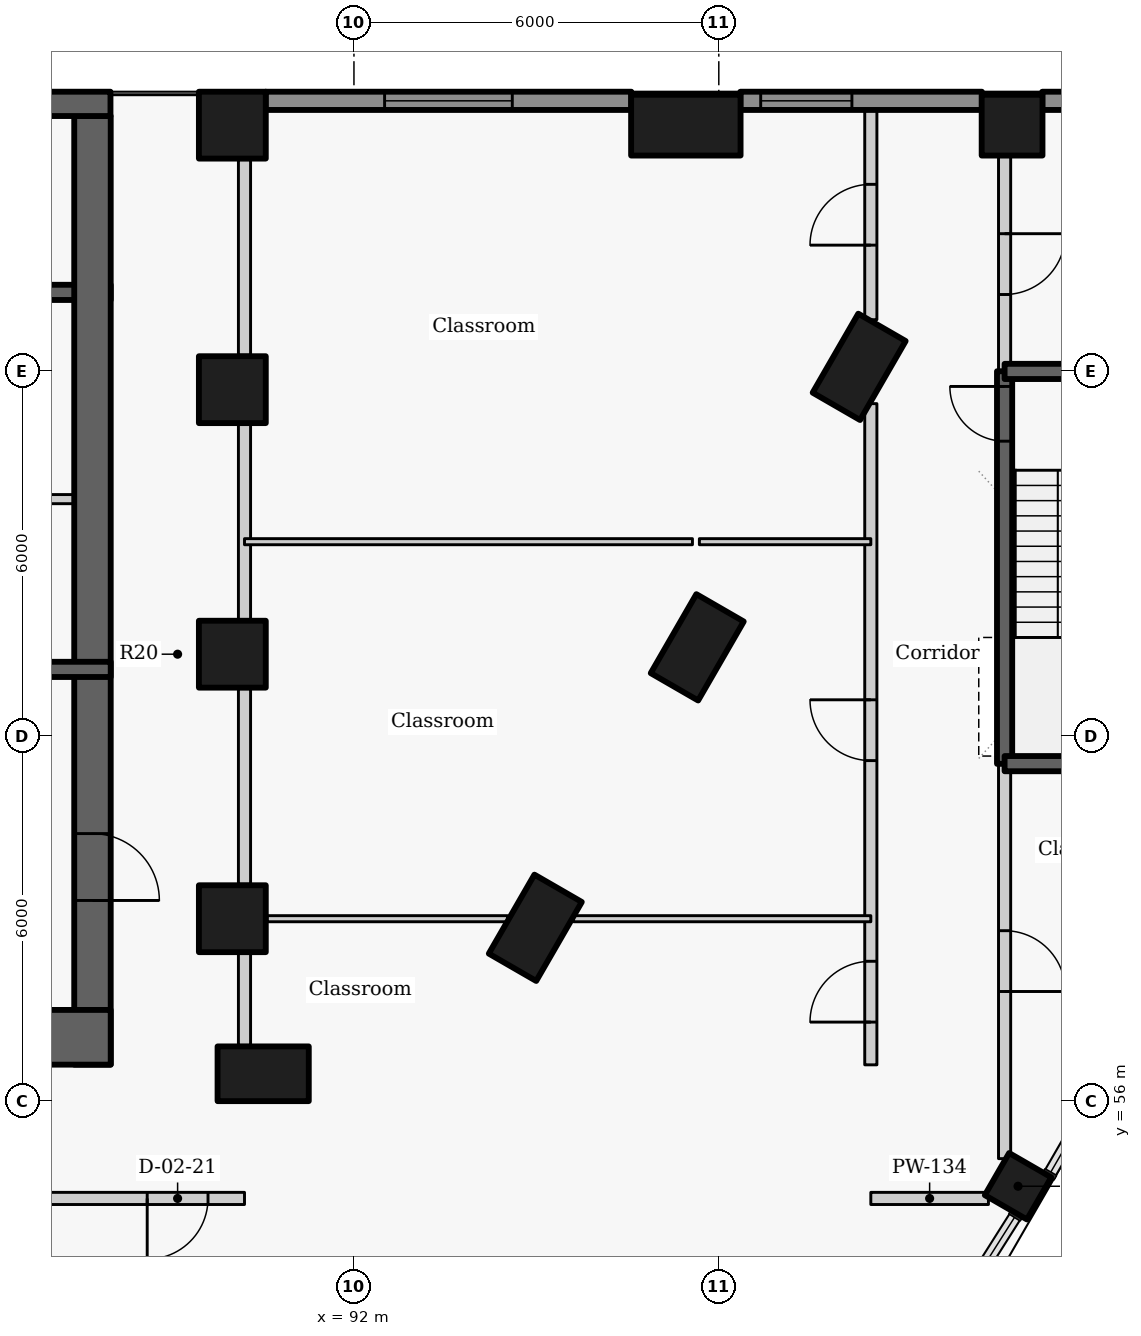
"""IFC4 building model, lengths in metres.
Left out: names, types, materials, properties, quantities, classifications, styles, units other than length and angle.
Written with IfcOpenShell. Run it as: python <this file> out.ifc"""

import sys

from ifc_helpers import new_model, si_unit, direction, frame, frame_2d, origin, origin_2d, place, context, subcontext, project, spatial, rectangle, extrude, element, fill, save


model = new_model("IFC4")
c1 = context("Model", 3, precision=1e-05, world=origin(), true_north=direction((0.0, 1.0)))
c2 = subcontext(c1, "Body", "Model", "MODEL_VIEW")
j1 = project(units=[si_unit("LENGTHUNIT", "METRE"), si_unit("PLANEANGLEUNIT", "RADIAN")], contexts=[c1])
p1 = place(None, origin())
s1 = spatial("IfcSite", under=j1, at=p1, CompositionType="ELEMENT")
p2 = place(p1, origin())
s2 = spatial("IfcBuilding", under=s1, at=p2, CompositionType="ELEMENT")
p3 = place(p2, frame((0.0, 0.0, 15.6)))
s3 = spatial("IfcBuildingStorey", under=s2, at=p3, CompositionType="ELEMENT", Elevation=15.6)
for number, where, z_axis, x_axis in (
    (1, (90.507, 56.45, 0.0), (0.0, 0.0, 1.0), (1.0, 0.0, 0.0)),
    (2, (94.982, 58.851, 0.0), (0.0, 0.0, 1.0), (0.5, 0.866, 0.0)),
    (3, (97.646, 63.463, 0.0), (0.0, 0.0, 1.0), (0.5, 0.866, 0.0)),
    (4, (100.308, 68.075, 0.0), (0.0, 0.0, 1.0), (0.5, 0.866, 0.0)),
):
    element("IfcColumn", number, at=place(p3, frame(where, z_axis=z_axis, x_axis=x_axis)), inside=s3, PredefinedType="COLUMN", context=c2, shape_type="SweptSolid", body=[
        extrude(rectangle(XDim=1.5, YDim=0.9, at=origin_2d()), origin(), (0.0, 0.0, 1.0), 4.2),
    ])
for number, where, z_axis, x_axis in (
    (5, (90.0, 59.0, 0.0), (0.0, 0.0, 1.0), (0.0, 1.0, 0.0)),
    (6, (90.0, 63.35, 0.0), (0.0, 0.0, 1.0), (0.0, 1.0, 0.0)),
    (7, (90.0, 67.7, 0.0), (0.0, 0.0, 1.0), (0.0, 1.0, 0.0)),
    (8, (90.0, 72.05, 0.0), (0.0, 0.0, 1.0), (0.0, 1.0, 0.0)),
):
    element("IfcColumn", number, at=place(p3, frame(where, z_axis=z_axis, x_axis=x_axis)), inside=s3, PredefinedType="COLUMN", context=c2, shape_type="SweptSolid", body=[
        extrude(rectangle(XDim=1.1, YDim=1.1, at=origin_2d()), origin(), (0.0, 0.0, 1.0), 4.2),
    ])
p4 = place(p3, frame((102.921, 54.6, 0.0), z_axis=(0.0, 0.0, 1.0), x_axis=(0.5, 0.866025403784, 0.0)))
e9 = element("IfcColumn", 9, at=p4, inside=s3, PredefinedType="COLUMN", context=c2, shape_type="SweptSolid", body=[
    extrude(rectangle(XDim=0.8, YDim=0.8, at=origin_2d()), origin(), (0.0, 0.0, 1.0), 4.2),
])
p5 = place(p3, frame((97.458, 72.05, 0.0), z_axis=(0.0, 0.0, 1.0), x_axis=(1.0, 0.0, 0.0)))
e10 = element("IfcColumn", 10, at=p5, inside=s3, PredefinedType="COLUMN", context=c2, shape_type="SweptSolid", body=[
    extrude(rectangle(XDim=1.8, YDim=1.0, at=origin_2d()), origin(), (0.0, 0.0, 1.0), 4.2),
])
p6 = place(p3, frame((102.823, 72.05, 0.0), z_axis=(0.0, 0.0, 1.0), x_axis=(1.0, 0.0, 0.0)))
e11 = element("IfcColumn", 11, at=p6, inside=s3, PredefinedType="COLUMN", context=c2, shape_type="SweptSolid", body=[
    extrude(rectangle(XDim=1.0, YDim=1.0, at=origin_2d()), origin(), (0.0, 0.0, 1.0), 4.2),
])
p7 = place(p3, frame((107.413, 72.45, 0.0), z_axis=(0.0, 0.0, 1.0), x_axis=(-1.0, 0.0, 0.0)))
e12 = element("IfcWall", 12, at=p7, inside=s3, PredefinedType="SOLIDWALL", context=c2, shape_type="SweptSolid", body=[
    extrude(rectangle(XDim=4.094, YDim=0.3, at=frame_2d((2.047, 0.0))), origin(), (0.0, 0.0, 1.0), 3.0),
])
p8 = place(p7, frame((0.997, 0.0, 0.9)))
e13 = element("IfcOpeningElement", 13, at=p8, cuts=e12, PredefinedType="OPENING", context=c2, shape_type="SweptSolid", body=[
    extrude(rectangle(XDim=2.1, YDim=2.05, at=frame_2d((1.05, 1.025))), frame((0.0, 0.16, 0.0), z_axis=(0.0, -1.0, 0.0), x_axis=(1.0, 0.0, 0.0)), (0.0, 0.0, 1.0), 0.32),
])
p9 = place(p3, frame((102.327, 72.45, 0.0), z_axis=(0.0, 0.0, 1.0), x_axis=(-1.0, 0.0, 0.0)))
e14 = element("IfcWall", 14, at=p9, inside=s3, PredefinedType="SOLIDWALL", context=c2, shape_type="SweptSolid", body=[
    extrude(rectangle(XDim=3.973, YDim=0.3, at=frame_2d((1.986, 0.0))), origin(), (0.0, 0.0, 1.0), 3.0),
])
p10 = place(p9, frame((2.138, 0.0, 0.9)))
e15 = element("IfcOpeningElement", 15, at=p10, cuts=e14, PredefinedType="OPENING", context=c2, shape_type="SweptSolid", body=[
    extrude(rectangle(XDim=1.5, YDim=2.05, at=frame_2d((0.75, 1.025))), frame((0.0, 0.16, 0.0), z_axis=(0.0, -1.0, 0.0), x_axis=(1.0, 0.0, 0.0)), (0.0, 0.0, 1.0), 0.32),
])
p11 = place(p3, frame((96.562, 72.45, 0.0), z_axis=(0.0, 0.0, 1.0), x_axis=(-1.0, 0.0, 0.0)))
e16 = element("IfcWall", 16, at=p11, inside=s3, PredefinedType="SOLIDWALL", context=c2, shape_type="SweptSolid", body=[
    extrude(rectangle(XDim=6.016, YDim=0.3, at=frame_2d((3.008, 0.0))), origin(), (0.0, 0.0, 1.0), 3.0),
])
p12 = place(p11, frame((1.958, 0.0, 0.9)))
e17 = element("IfcOpeningElement", 17, at=p12, cuts=e16, PredefinedType="OPENING", context=c2, shape_type="SweptSolid", body=[
    extrude(rectangle(XDim=2.1, YDim=2.05, at=frame_2d((1.05, 1.025))), frame((0.0, 0.16, 0.0), z_axis=(0.0, -1.0, 0.0), x_axis=(1.0, 0.0, 0.0)), (0.0, 0.0, 1.0), 0.32),
])
p13 = place(p3, frame((85.4, 69.3, -0.3), z_axis=(0.0, 0.0, 1.0), x_axis=(1.0, 0.0, 0.0)))
e18 = element("IfcWall", 18, at=p13, inside=s3, PredefinedType="SHEAR", context=c2, shape_type="SweptSolid", body=[
    extrude(rectangle(XDim=2.6, YDim=0.25, at=frame_2d((1.3, 0.0))), origin(), (0.0, 0.0, 1.0), 4.2),
])
p14 = place(p13, frame((0.525, 0.0, 0.3)))
e19 = element("IfcOpeningElement", 19, at=p14, cuts=e18, PredefinedType="OPENING", context=c2, shape_type="SweptSolid", body=[
    extrude(rectangle(XDim=0.9, YDim=2.1, at=frame_2d((0.45, 1.05))), frame((0.0, 0.135, 0.0), z_axis=(0.0, -1.0, 0.0), x_axis=(1.0, 0.0, 0.0)), (0.0, 0.0, 1.0), 0.27),
])
p15 = place(p3, frame((87.7, 72.2, -0.3), z_axis=(0.0, 0.0, 1.0), x_axis=(0.0, -1.0, 0.0)))
e20 = element("IfcWall", 20, at=p15, inside=s3, PredefinedType="SHEAR", context=c2, shape_type="SweptSolid", body=[
    extrude(rectangle(XDim=15.6, YDim=0.6, at=frame_2d((7.8, 0.0))), origin(), (0.0, 0.0, 1.0), 4.2),
])
p16 = place(p15, frame((11.8, 0.0, 0.3)))
e21 = element("IfcOpeningElement", 21, at=p16, cuts=e20, PredefinedType="OPENING", context=c2, shape_type="SweptSolid", body=[
    extrude(rectangle(XDim=1.1, YDim=2.1, at=frame_2d((0.55, 1.05))), frame((0.0, 0.31, 0.0), z_axis=(0.0, -1.0, 0.0), x_axis=(1.0, 0.0, 0.0)), (0.0, 0.0, 1.0), 0.62),
])
p17 = place(p3, frame((88.0, 65.9, 0.0), z_axis=(0.0, 0.0, 1.0), x_axis=(-1.0, 0.0, 0.0)))
e22 = element("IfcWall", 22, at=p17, inside=s3, PredefinedType="PARTITIONING", context=c2, shape_type="SweptSolid", body=[
    extrude(rectangle(XDim=2.603, YDim=0.15, at=frame_2d((1.302, 0.0))), origin(), (0.0, 0.0, 1.0), 3.9),
])
p18 = place(p17, frame((1.175, 0.0, 0.0)))
e23 = element("IfcOpeningElement", 23, at=p18, cuts=e22, PredefinedType="OPENING", context=c2, shape_type="SweptSolid", body=[
    extrude(rectangle(XDim=0.9, YDim=2.1, at=frame_2d((0.45, 1.05))), frame((0.0, 0.085, 0.0), z_axis=(0.0, -1.0, 0.0), x_axis=(1.0, 0.0, 0.0)), (0.0, 0.0, 1.0), 0.17),
])
p19 = place(p3, frame((80.0, 63.1, -0.3), z_axis=(0.0, 0.0, 1.0), x_axis=(1.0, 0.0, 0.0)))
e24 = element("IfcWall", 24, at=p19, inside=s3, PredefinedType="SHEAR", context=c2, shape_type="SweptSolid", body=[
    extrude(rectangle(XDim=8.0, YDim=0.25, at=frame_2d((4.0, 0.0))), origin(), (0.0, 0.0, 1.0), 4.2),
])
p20 = place(p19, frame((3.849, 0.0, 0.3)))
e25 = element("IfcOpeningElement", 25, at=p20, cuts=e24, PredefinedType="OPENING", context=c2, shape_type="SweptSolid", body=[
    extrude(rectangle(XDim=1.1, YDim=2.1, at=frame_2d((0.55, 1.05))), frame((0.0, 0.135, 0.0), z_axis=(0.0, -1.0, 0.0), x_axis=(1.0, 0.0, 0.0)), (0.0, 0.0, 1.0), 0.27),
])
p21 = place(p3, frame((88.0, 57.05, -0.3), z_axis=(0.0, 0.0, 1.0), x_axis=(-1.0, 0.0, 0.0)))
e26 = element("IfcWall", 26, at=p21, inside=s3, PredefinedType="SHEAR", context=c2, shape_type="SweptSolid", body=[
    extrude(rectangle(XDim=4.6, YDim=0.9, at=frame_2d((2.3, 0.0))), origin(), (0.0, 0.0, 1.0), 4.2),
])
p22 = place(p21, frame((1.752, 0.0, 0.3)))
e27 = element("IfcOpeningElement", 27, at=p22, cuts=e26, PredefinedType="OPENING", context=c2, shape_type="SweptSolid", body=[
    extrude(rectangle(XDim=1.1, YDim=2.1, at=frame_2d((0.55, 1.05))), frame((0.0, 0.46, 0.0), z_axis=(0.0, -1.0, 0.0), x_axis=(1.0, 0.0, 0.0)), (0.0, 0.0, 1.0), 0.92),
])
p23 = place(p3, frame((102.7, 61.547, -0.3), z_axis=(0.0, 0.0, 1.0), x_axis=(0.0, 1.0, 0.0)))
e28 = element("IfcWall", 28, at=p23, inside=s3, PredefinedType="SHEAR", context=c2, shape_type="SweptSolid", body=[
    extrude(rectangle(XDim=6.456, YDim=0.25, at=frame_2d((3.228, 0.0))), origin(), (0.0, 0.0, 1.0), 4.2),
])
p24 = place(p23, frame((5.306, 0.0, 0.3)))
e29 = element("IfcOpeningElement", 29, at=p24, cuts=e28, PredefinedType="OPENING", context=c2, shape_type="SweptSolid", body=[
    extrude(rectangle(XDim=0.9, YDim=2.1, at=frame_2d((0.45, 1.05))), frame((0.0, 0.135, 0.0), z_axis=(0.0, -1.0, 0.0), x_axis=(1.0, 0.0, 0.0)), (0.0, 0.0, 1.0), 0.27),
])
p25 = place(p3, frame((102.7, 61.553, 0.0), z_axis=(0.0, 0.0, 1.0), x_axis=(0.0, -1.0, 0.0)))
e30 = element("IfcWall", 30, at=p25, inside=s3, PredefinedType="PARTITIONING", context=c2, shape_type="SweptSolid", body=[
    extrude(rectangle(XDim=6.499, YDim=0.2, at=frame_2d((3.249, 0.0))), origin(), (0.0, 0.0, 1.0), 3.9),
])
p26 = place(p25, frame((2.75, 0.0, 0.0)))
e31 = element("IfcOpeningElement", 31, at=p26, cuts=e30, PredefinedType="OPENING", context=c2, shape_type="SweptSolid", body=[
    extrude(rectangle(XDim=1.0, YDim=2.1, at=frame_2d((0.5, 1.05))), frame((0.0, 0.11, 0.0), z_axis=(0.0, -1.0, 0.0), x_axis=(1.0, 0.0, 0.0)), (0.0, 0.0, 1.0), 0.22),
])
p27 = place(p3, frame((102.7, 71.533, 0.0), z_axis=(0.0, 0.0, 1.0), x_axis=(0.0, -1.0, 0.0)))
e32 = element("IfcWall", 32, at=p27, inside=s3, PredefinedType="PARTITIONING", context=c2, shape_type="SweptSolid", body=[
    extrude(rectangle(XDim=3.536, YDim=0.2, at=frame_2d((1.768, 0.0))), origin(), (0.0, 0.0, 1.0), 3.9),
])
p28 = place(p27, frame((1.268, 0.0, 0.0)))
e33 = element("IfcOpeningElement", 33, at=p28, cuts=e32, PredefinedType="OPENING", context=c2, shape_type="SweptSolid", body=[
    extrude(rectangle(XDim=1.0, YDim=2.1, at=frame_2d((0.5, 1.05))), frame((0.0, 0.11, 0.0), z_axis=(0.0, -1.0, 0.0), x_axis=(1.0, 0.0, 0.0)), (0.0, 0.0, 1.0), 0.22),
])
p29 = place(p3, frame((100.5, 56.597, 0.0), z_axis=(0.0, 0.0, 1.0), x_axis=(0.0, 1.0, 0.0)))
e34 = element("IfcWall", 34, at=p29, inside=s3, PredefinedType="PARTITIONING", context=c2, shape_type="SweptSolid", body=[
    extrude(rectangle(XDim=10.873, YDim=0.2, at=frame_2d((5.437, 0.0))), origin(), (0.0, 0.0, 1.0), 3.9),
])
p30 = place(p29, frame((5.003, 0.0, 0.0)))
e35 = element("IfcOpeningElement", 35, at=p30, cuts=e34, PredefinedType="OPENING", context=c2, shape_type="SweptSolid", body=[
    extrude(rectangle(XDim=1.0, YDim=2.1, at=frame_2d((0.5, 1.05))), frame((0.0, 0.11, 0.0), z_axis=(0.0, -1.0, 0.0), x_axis=(1.0, 0.0, 0.0)), (0.0, 0.0, 1.0), 0.22),
])
p31 = place(p29, frame((0.703, 0.0, 0.0)))
e36 = element("IfcOpeningElement", 36, at=p31, cuts=e34, PredefinedType="OPENING", context=c2, shape_type="SweptSolid", body=[
    extrude(rectangle(XDim=1.0, YDim=2.1, at=frame_2d((0.5, 1.05))), frame((0.0, 0.11, 0.0), z_axis=(0.0, -1.0, 0.0), x_axis=(1.0, 0.0, 0.0)), (0.0, 0.0, 1.0), 0.22),
])
p32 = place(p3, frame((100.5, 68.851, 0.0), z_axis=(0.0, 0.0, 1.0), x_axis=(0.0, 1.0, 0.0)))
e37 = element("IfcWall", 37, at=p32, inside=s3, PredefinedType="PARTITIONING", context=c2, shape_type="SweptSolid", body=[
    extrude(rectangle(XDim=3.449, YDim=0.2, at=frame_2d((1.725, 0.0))), origin(), (0.0, 0.0, 1.0), 3.13),
])
p33 = place(p32, frame((1.226, 0.0, 0.0)))
e38 = element("IfcOpeningElement", 38, at=p33, cuts=e37, PredefinedType="OPENING", context=c2, shape_type="SweptSolid", body=[
    extrude(rectangle(XDim=1.0, YDim=2.1, at=frame_2d((0.5, 1.05))), frame((0.0, 0.11, 0.0), z_axis=(0.0, -1.0, 0.0), x_axis=(1.0, 0.0, 0.0)), (0.0, 0.0, 1.0), 0.22),
])
p34 = place(p3, frame((90.2, 56.917, 0.0), z_axis=(0.0, 0.0, 1.0), x_axis=(0.0, 1.0, 0.0)))
e39 = element("IfcWall", 39, at=p34, inside=s3, PredefinedType="PARTITIONING", context=c2, shape_type="SweptSolid", body=[
    extrude(rectangle(XDim=1.516, YDim=0.2, at=frame_2d((0.758, 0.0))), origin(), (0.0, 0.0, 1.0), 3.9),
])
for number, where, z_axis, x_axis in (
    (40, (90.2, 59.567, 0.0), (0.0, 0.0, 1.0), (0.0, 1.0, 0.0)),
    (41, (90.2, 63.917, 0.0), (0.0, 0.0, 1.0), (0.0, 1.0, 0.0)),
):
    element("IfcWall", number, at=place(p3, frame(where, z_axis=z_axis, x_axis=x_axis)), inside=s3, PredefinedType="PARTITIONING", context=c2, shape_type="SweptSolid", body=[
        extrude(rectangle(XDim=3.216, YDim=0.2, at=frame_2d((1.608, 0.0))), origin(), (0.0, 0.0, 1.0), 3.13),
    ])
p35 = place(p3, frame((90.2, 68.267, 0.0), z_axis=(0.0, 0.0, 1.0), x_axis=(0.0, 1.0, 0.0)))
e42 = element("IfcWall", 42, at=p35, inside=s3, PredefinedType="PARTITIONING", context=c2, shape_type="SweptSolid", body=[
    extrude(rectangle(XDim=3.216, YDim=0.2, at=frame_2d((1.608, 0.0))), origin(), (0.0, 0.0, 1.0), 3.13),
])
p36 = place(p3, frame((90.2, 54.4, 0.0), z_axis=(0.0, 0.0, 1.0), x_axis=(-1.0, 0.0, 0.0)))
e43 = element("IfcWall", 43, at=p36, inside=s3, PredefinedType="PARTITIONING", context=c2, shape_type="SweptSolid", body=[
    extrude(rectangle(XDim=20.4, YDim=0.2, at=frame_2d((10.2, 0.0))), origin(), (0.0, 0.0, 1.0), 3.9),
])
p37 = place(p36, frame((18.8, 0.0, 0.0)))
e44 = element("IfcOpeningElement", 44, at=p37, cuts=e43, PredefinedType="OPENING", context=c2, shape_type="SweptSolid", body=[
    extrude(rectangle(XDim=1.0, YDim=2.1, at=frame_2d((0.5, 1.05))), frame((0.0, 0.11, 0.0), z_axis=(0.0, -1.0, 0.0), x_axis=(1.0, 0.0, 0.0)), (0.0, 0.0, 1.0), 0.22),
])
p38 = place(p36, frame((0.6, 0.0, 0.0)))
e45 = element("IfcOpeningElement", 45, at=p38, cuts=e43, PredefinedType="OPENING", context=c2, shape_type="SweptSolid", body=[
    extrude(rectangle(XDim=1.0, YDim=2.1, at=frame_2d((0.5, 1.05))), frame((0.0, 0.11, 0.0), z_axis=(0.0, -1.0, 0.0), x_axis=(1.0, 0.0, 0.0)), (0.0, 0.0, 1.0), 0.22),
])
p39 = place(p36, frame((10.1, 0.0, 0.0)))
e46 = element("IfcOpeningElement", 46, at=p39, cuts=e43, PredefinedType="OPENING", context=c2, shape_type="SweptSolid", body=[
    extrude(rectangle(XDim=1.0, YDim=2.1, at=frame_2d((0.5, 1.05))), frame((0.0, 0.11, 0.0), z_axis=(0.0, -1.0, 0.0), x_axis=(1.0, 0.0, 0.0)), (0.0, 0.0, 1.0), 0.22),
])
p40 = place(p3, frame((100.5, 54.4, 0.0), z_axis=(0.0, 0.0, 1.0), x_axis=(1.0, 0.0, 0.0)))
e47 = element("IfcWall", 47, at=p40, inside=s3, PredefinedType="PARTITIONING", context=c2, shape_type="SweptSolid", body=[
    extrude(rectangle(XDim=1.934, YDim=0.2, at=frame_2d((0.967, 0.0))), origin(), (0.0, 0.0, 1.0), 3.9),
])
for number, where, z_axis, x_axis in (
    (48, (102.7, 68.0, -0.3), (0.0, 0.0, 1.0), (1.0, 0.0, 0.0)),
    (49, (102.7, 61.55, -0.3), (0.0, 0.0, 1.0), (1.0, 0.0, 0.0)),
):
    element("IfcWall", number, at=place(p3, frame(where, z_axis=z_axis, x_axis=x_axis)), inside=s3, PredefinedType="SHEAR", context=c2, shape_type="SweptSolid", body=[
        extrude(rectangle(XDim=3.45, YDim=0.25, at=frame_2d((1.725, 0.0))), origin(), (0.0, 0.0, 1.0), 4.2),
    ])
p41 = place(p3, frame((90.2, 65.2, 0.0), z_axis=(0.0, 0.0, 1.0), x_axis=(1.0, 0.0, 0.0)))
e50 = element("IfcWall", 50, at=p41, inside=s3, PredefinedType="PARTITIONING", context=c2, shape_type="SweptSolid", body=[
    extrude(rectangle(XDim=7.366, YDim=0.1, at=frame_2d((3.683, 0.0))), origin(), (0.0, 0.0, 1.0), 3.9),
])
p42 = place(p3, frame((97.68, 65.2, 0.0), z_axis=(0.0, 0.0, 1.0), x_axis=(1.0, 0.0, 0.0)))
e51 = element("IfcWall", 51, at=p42, inside=s3, PredefinedType="PARTITIONING", context=c2, shape_type="SweptSolid", body=[
    extrude(rectangle(XDim=2.82, YDim=0.1, at=frame_2d((1.41, 0.0))), origin(), (0.0, 0.0, 1.0), 2.98),
])
p43 = place(p3, frame((90.57, 59.0, 0.0), z_axis=(0.0, 0.0, 1.0), x_axis=(1.0, 0.0, 0.0)))
e52 = element("IfcWall", 52, at=p43, inside=s3, PredefinedType="PARTITIONING", context=c2, shape_type="SweptSolid", body=[
    extrude(rectangle(XDim=3.956, YDim=0.1, at=frame_2d((1.978, 0.0))), origin(), (0.0, 0.0, 1.0), 3.9),
])
p44 = place(p3, frame((95.612, 59.0, 0.0), z_axis=(0.0, 0.0, 1.0), x_axis=(1.0, 0.0, 0.0)))
e53 = element("IfcWall", 53, at=p44, inside=s3, PredefinedType="PARTITIONING", context=c2, shape_type="SweptSolid", body=[
    extrude(rectangle(XDim=4.888, YDim=0.1, at=frame_2d((2.444, 0.0))), origin(), (0.0, 0.0, 1.0), 3.9),
])
p45 = place(p3, frame((72.004, 72.4, -0.3), z_axis=(0.0, 0.0, 1.0), x_axis=(1.0, 0.0, 0.0)))
e54 = element("IfcWall", 54, at=p45, inside=s3, PredefinedType="SHEAR", context=c2, shape_type="SweptSolid", body=[
    extrude(rectangle(XDim=15.992, YDim=0.4, at=frame_2d((7.996, 0.0))), origin(), (0.0, 0.0, 1.0), 4.2),
])
p46 = place(p10, origin())
e55 = element("IfcWindow", 55, at=p46, inside=s3, PartitioningType="SINGLE_PANEL", PredefinedType="WINDOW", context=c2, shape_type="SweptSolid", body=[
    extrude(rectangle(XDim=1.5, YDim=2.05, at=frame_2d((0.75, 1.025))), frame((0.0, 0.03, 0.0), z_axis=(0.0, -1.0, 0.0), x_axis=(1.0, 0.0, 0.0)), (0.0, 0.0, 1.0), 0.06),
])
fill(e15, e55)
p47 = place(p12, origin())
e56 = element("IfcWindow", 56, at=p47, inside=s3, PartitioningType="SINGLE_PANEL", PredefinedType="WINDOW", context=c2, shape_type="SweptSolid", body=[
    extrude(rectangle(XDim=2.1, YDim=2.05, at=frame_2d((1.05, 1.025))), frame((0.0, 0.03, 0.0), z_axis=(0.0, -1.0, 0.0), x_axis=(1.0, 0.0, 0.0)), (0.0, 0.0, 1.0), 0.06),
])
fill(e17, e56)
p48 = place(p24, origin())
e57 = element("IfcDoor", 57, at=p48, inside=s3, OperationType="SINGLE_SWING_RIGHT", PredefinedType="DOOR", context=c2, shape_type="SweptSolid", body=[
    extrude(rectangle(XDim=0.9, YDim=2.1, at=frame_2d((0.45, 1.05))), frame((0.0, 0.025, 0.0), z_axis=(0.0, -1.0, 0.0), x_axis=(1.0, 0.0, 0.0)), (0.0, 0.0, 1.0), 0.05),
])
fill(e29, e57)
p49 = place(p28, origin())
e58 = element("IfcDoor", 58, at=p49, inside=s3, OperationType="SINGLE_SWING_LEFT", PredefinedType="DOOR", context=c2, shape_type="SweptSolid", body=[
    extrude(rectangle(XDim=1.0, YDim=2.1, at=frame_2d((0.5, 1.05))), frame((0.0, 0.025, 0.0), z_axis=(0.0, -1.0, 0.0), x_axis=(1.0, 0.0, 0.0)), (0.0, 0.0, 1.0), 0.05),
])
fill(e33, e58)
p50 = place(p26, origin())
e59 = element("IfcDoor", 59, at=p50, inside=s3, OperationType="SINGLE_SWING_RIGHT", PredefinedType="DOOR", context=c2, shape_type="SweptSolid", body=[
    extrude(rectangle(XDim=1.0, YDim=2.1, at=frame_2d((0.5, 1.05))), frame((0.0, 0.025, 0.0), z_axis=(0.0, -1.0, 0.0), x_axis=(1.0, 0.0, 0.0)), (0.0, 0.0, 1.0), 0.05),
])
fill(e31, e59)
p51 = place(p33, origin())
e60 = element("IfcDoor", 60, at=p51, inside=s3, OperationType="SINGLE_SWING_LEFT", PredefinedType="DOOR", context=c2, shape_type="SweptSolid", body=[
    extrude(rectangle(XDim=1.0, YDim=2.1, at=frame_2d((0.5, 1.05))), frame((0.0, 0.025, 0.0), z_axis=(0.0, -1.0, 0.0), x_axis=(1.0, 0.0, 0.0)), (0.0, 0.0, 1.0), 0.05),
])
fill(e38, e60)
p52 = place(p30, origin())
e61 = element("IfcDoor", 61, at=p52, inside=s3, OperationType="SINGLE_SWING_RIGHT", PredefinedType="DOOR", context=c2, shape_type="SweptSolid", body=[
    extrude(rectangle(XDim=1.0, YDim=2.1, at=frame_2d((0.5, 1.05))), frame((0.0, 0.025, 0.0), z_axis=(0.0, -1.0, 0.0), x_axis=(1.0, 0.0, 0.0)), (0.0, 0.0, 1.0), 0.05),
])
fill(e35, e61)
p53 = place(p31, origin())
e62 = element("IfcDoor", 62, at=p53, inside=s3, OperationType="SINGLE_SWING_LEFT", PredefinedType="DOOR", context=c2, shape_type="SweptSolid", body=[
    extrude(rectangle(XDim=1.0, YDim=2.1, at=frame_2d((0.5, 1.05))), frame((0.0, 0.025, 0.0), z_axis=(0.0, -1.0, 0.0), x_axis=(1.0, 0.0, 0.0)), (0.0, 0.0, 1.0), 0.05),
])
fill(e36, e62)
p54 = place(p38, origin())
e63 = element("IfcDoor", 63, at=p54, inside=s3, OperationType="SINGLE_SWING_RIGHT", PredefinedType="DOOR", context=c2, shape_type="SweptSolid", body=[
    extrude(rectangle(XDim=1.0, YDim=2.1, at=frame_2d((0.5, 1.05))), frame((0.0, 0.025, 0.0), z_axis=(0.0, -1.0, 0.0), x_axis=(1.0, 0.0, 0.0)), (0.0, 0.0, 1.0), 0.05),
])
fill(e45, e63)
p55 = place(p16, origin())
e64 = element("IfcDoor", 64, at=p55, inside=s3, OperationType="SINGLE_SWING_RIGHT", PredefinedType="DOOR", context=c2, shape_type="SweptSolid", body=[
    extrude(rectangle(XDim=1.1, YDim=2.1, at=frame_2d((0.55, 1.05))), frame((0.0, 0.025, 0.0), z_axis=(0.0, -1.0, 0.0), x_axis=(1.0, 0.0, 0.0)), (0.0, 0.0, 1.0), 0.05),
])
fill(e21, e64)
save(model, sys.argv[1])
